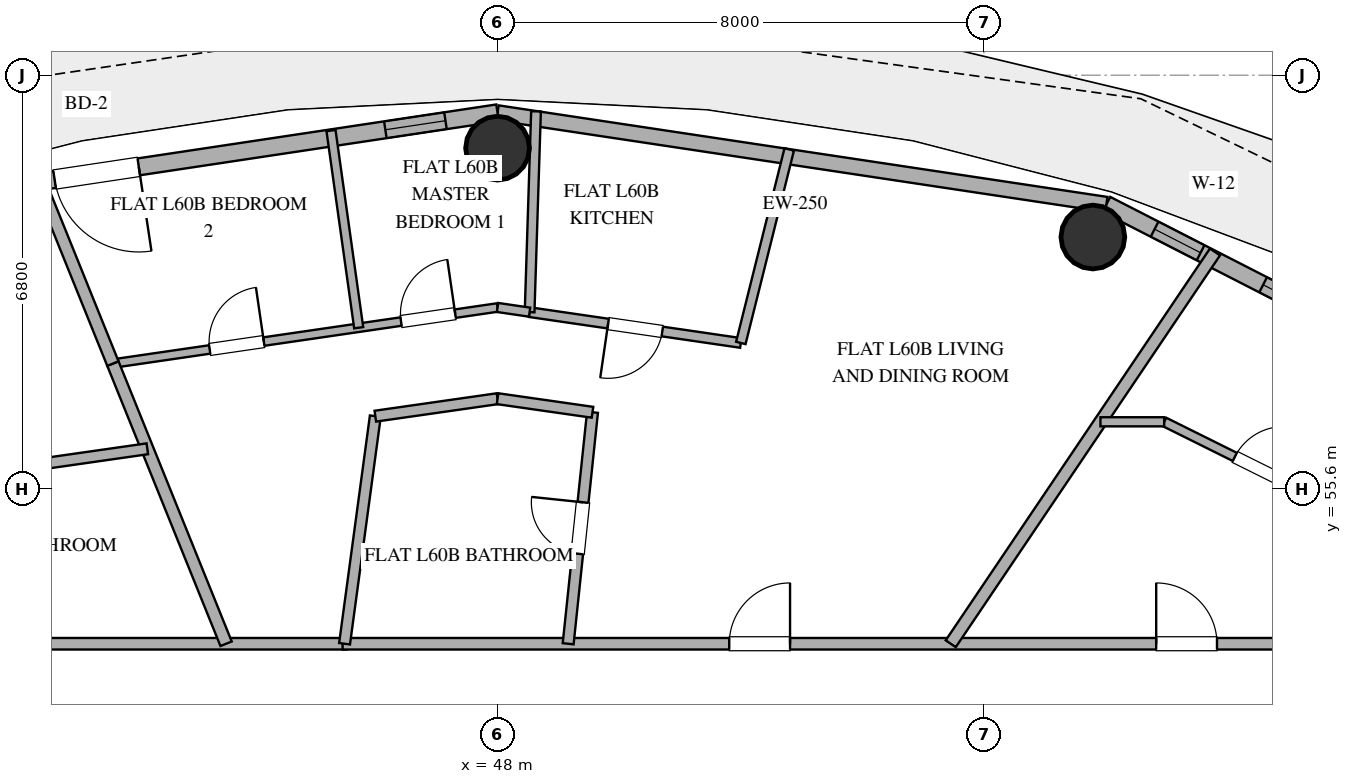
"""IFC4 building model, lengths in metres.
Left out: names, types, materials, properties, quantities, classifications, styles, units other than length and angle.
Written with IfcOpenShell. Run it as: python <this file> out.ifc"""

import sys

from ifc_helpers import new_model, si_unit, direction, frame, frame_2d, origin, origin_2d, place, context, subcontext, project, spatial, rectangle, hollow_circle, extrude, element, fill, save


model = new_model("IFC4")
c1 = context("Model", 3, precision=1e-05, world=origin(), true_north=direction((0.0, 1.0)))
c2 = subcontext(c1, "Body", "Model", "MODEL_VIEW")
j1 = project(units=[si_unit("LENGTHUNIT", "METRE"), si_unit("PLANEANGLEUNIT", "RADIAN")], contexts=[c1])
p1 = place(None, origin())
s1 = spatial("IfcSite", under=j1, at=p1, CompositionType="ELEMENT")
p2 = place(p1, origin())
s2 = spatial("IfcBuilding", under=s1, at=p2, CompositionType="ELEMENT")
p3 = place(p2, frame((0.0, 0.0, 235.2)))
s3 = spatial("IfcBuildingStorey", under=s2, at=p3, CompositionType="ELEMENT", Elevation=235.2)
for number, where, z_axis, x_axis in (
    (1, (57.791, 59.739, 0.0), (0.0, 0.0, 1.0), (1.0, 0.0, 0.0)),
    (2, (48.0, 61.2, 0.0), (0.0, 0.0, 1.0), (1.0, 0.0, 0.0)),
):
    element("IfcColumn", number, at=place(p3, frame(where, z_axis=z_axis, x_axis=x_axis)), inside=s3, PredefinedType="COLUMN", context=c2, shape_type="SweptSolid", body=[
        extrude(hollow_circle(Radius=0.525, WallThickness=0.028, at=origin_2d()), origin(), (0.0, 0.0, 1.0), 3.36),
    ])
p4 = place(p3, frame((66.383, 55.987, 0.0), z_axis=(0.0, 0.0, 1.0), x_axis=(-0.890007394051, 0.455946091699, 0.0)))
e3 = element("IfcWall", 3, at=p4, inside=s3, PredefinedType="SOLIDWALL", context=c2, shape_type="SweptSolid", body=[
    extrude(rectangle(XDim=9.404, YDim=0.28, at=frame_2d((4.702, 0.0))), origin(), (0.0, 0.0, 1.0), 3.36),
])
p5 = place(p4, frame((3.406, 0.0, 0.85)))
e4 = element("IfcOpeningElement", 4, at=p5, cuts=e3, PredefinedType="OPENING", context=c2, shape_type="SweptSolid", body=[
    extrude(rectangle(XDim=1.2, YDim=1.6, at=frame_2d((0.6, 0.8))), frame((0.0, 0.15, 0.0), z_axis=(0.0, -1.0, 0.0), x_axis=(1.0, 0.0, 0.0)), (0.0, 0.0, 1.0), 0.3),
])
p6 = place(p4, frame((5.307, 0.0, 0.85)))
e5 = element("IfcOpeningElement", 5, at=p6, cuts=e3, PredefinedType="OPENING", context=c2, shape_type="SweptSolid", body=[
    extrude(rectangle(XDim=1.2, YDim=1.6, at=frame_2d((0.6, 0.8))), frame((0.0, 0.15, 0.0), z_axis=(0.0, -1.0, 0.0), x_axis=(1.0, 0.0, 0.0)), (0.0, 0.0, 1.0), 0.3),
])
p7 = place(p4, frame((7.663, 0.0, 0.85)))
e6 = element("IfcOpeningElement", 6, at=p7, cuts=e3, PredefinedType="OPENING", context=c2, shape_type="SweptSolid", body=[
    extrude(rectangle(XDim=0.85, YDim=1.8, at=frame_2d((0.425, 0.9))), frame((0.0, 0.15, 0.0), z_axis=(0.0, -1.0, 0.0), x_axis=(1.0, 0.0, 0.0)), (0.0, 0.0, 1.0), 0.3),
])
p8 = place(p3, frame((58.013, 60.274, 0.0), z_axis=(0.0, 0.0, 1.0), x_axis=(-0.988882522213, 0.148698881169, 0.0)))
e7 = element("IfcWall", 7, at=p8, inside=s3, PredefinedType="SOLIDWALL", context=c2, shape_type="SweptSolid", body=[
    extrude(rectangle(XDim=10.125, YDim=0.25, at=frame_2d((5.062, 0.0))), origin(), (0.0, 0.0, 1.0), 3.36),
])
p9 = place(p3, frame((48.0, 61.78, 0.0), z_axis=(0.0, 0.0, 1.0), x_axis=(-0.988882522213, -0.148698881169, 0.0)))
e8 = element("IfcWall", 8, at=p9, inside=s3, PredefinedType="SOLIDWALL", context=c2, shape_type="SweptSolid", body=[
    extrude(rectangle(XDim=10.125, YDim=0.28, at=frame_2d((5.062, 0.0))), origin(), (0.0, 0.0, 1.0), 3.36),
])
p10 = place(p9, frame((5.967, 0.0, 0.0)))
e9 = element("IfcOpeningElement", 9, at=p10, cuts=e8, PredefinedType="OPENING", context=c2, shape_type="SweptSolid", body=[
    extrude(rectangle(XDim=1.4, YDim=2.2, at=frame_2d((0.7, 1.1))), frame((0.0, 0.15, 0.0), z_axis=(0.0, -1.0, 0.0), x_axis=(1.0, 0.0, 0.0)), (0.0, 0.0, 1.0), 0.3),
])
p11 = place(p9, frame((0.866, 0.0, 0.85)))
e10 = element("IfcOpeningElement", 10, at=p11, cuts=e8, PredefinedType="OPENING", context=c2, shape_type="SweptSolid", body=[
    extrude(rectangle(XDim=1.0, YDim=1.8, at=frame_2d((0.5, 0.9))), frame((0.0, 0.15, 0.0), z_axis=(0.0, -1.0, 0.0), x_axis=(1.0, 0.0, 0.0)), (0.0, 0.0, 1.0), 0.3),
])
p12 = place(p3, frame((32.75, 53.05, 0.0), z_axis=(0.0, 0.0, 1.0), x_axis=(1.0, 0.0, 0.0)))
e11 = element("IfcWall", 11, at=p12, inside=s3, PredefinedType="PARTITIONING", context=c2, shape_type="SweptSolid", body=[
    extrude(rectangle(XDim=12.766, YDim=0.19, at=frame_2d((6.383, 0.0))), origin(), (0.0, 0.0, 1.0), 2.72),
])
p13 = place(p3, frame((45.452, 53.05, 0.0), z_axis=(0.0, 0.0, 1.0), x_axis=(1.0, 0.0, 0.0)))
e12 = element("IfcWall", 12, at=p13, inside=s3, PredefinedType="PARTITIONING", context=c2, shape_type="SweptSolid", body=[
    extrude(rectangle(XDim=17.798, YDim=0.19, at=frame_2d((8.899, 0.0))), origin(), (0.0, 0.0, 1.0), 2.72),
])
p14 = place(p13, frame((13.381, 0.0, 0.0)))
e13 = element("IfcOpeningElement", 13, at=p14, cuts=e12, PredefinedType="OPENING", context=c2, shape_type="SweptSolid", body=[
    extrude(rectangle(XDim=1.0, YDim=2.2, at=frame_2d((0.5, 1.1))), frame((0.0, 0.105, 0.0), z_axis=(0.0, -1.0, 0.0), x_axis=(1.0, 0.0, 0.0)), (0.0, 0.0, 1.0), 0.21),
])
p15 = place(p13, frame((6.359, 0.0, 0.0)))
e14 = element("IfcOpeningElement", 14, at=p15, cuts=e12, PredefinedType="OPENING", context=c2, shape_type="SweptSolid", body=[
    extrude(rectangle(XDim=1.0, YDim=2.2, at=frame_2d((0.5, 1.1))), frame((0.0, 0.105, 0.0), z_axis=(0.0, -1.0, 0.0), x_axis=(1.0, 0.0, 0.0)), (0.0, 0.0, 1.0), 0.21),
])
p16 = place(p3, frame((59.799, 59.493, 0.0), z_axis=(0.0, 0.0, 1.0), x_axis=(-0.559208454265, -0.8290270832, 0.0)))
e15 = element("IfcWall", 15, at=p16, inside=s3, PredefinedType="PARTITIONING", context=c2, shape_type="SweptSolid", body=[
    extrude(rectangle(XDim=7.771, YDim=0.2, at=frame_2d((3.886, 0.0))), origin(), (0.0, 0.0, 1.0), 2.72),
])
p17 = place(p3, frame((41.674, 57.657, 0.0), z_axis=(0.0, 0.0, 1.0), x_axis=(0.989537524877, 0.144275732054, 0.0)))
e16 = element("IfcWall", 16, at=p17, inside=s3, PredefinedType="PARTITIONING", context=c2, shape_type="SweptSolid", body=[
    extrude(rectangle(XDim=6.393, YDim=0.14, at=frame_2d((3.197, 0.0))), origin(), (0.0, 0.0, 1.0), 2.72),
])
p18 = place(p17, frame((1.609, 0.0, 0.0)))
e17 = element("IfcOpeningElement", 17, at=p18, cuts=e16, PredefinedType="OPENING", context=c2, shape_type="SweptSolid", body=[
    extrude(rectangle(XDim=0.9, YDim=2.1, at=frame_2d((0.45, 1.05))), frame((0.0, 0.08, 0.0), z_axis=(0.0, -1.0, 0.0), x_axis=(1.0, 0.0, 0.0)), (0.0, 0.0, 1.0), 0.16),
])
p19 = place(p17, frame((4.789, 0.0, 0.0)))
e18 = element("IfcOpeningElement", 18, at=p19, cuts=e16, PredefinedType="OPENING", context=c2, shape_type="SweptSolid", body=[
    extrude(rectangle(XDim=0.9, YDim=2.1, at=frame_2d((0.45, 1.05))), frame((0.0, 0.08, 0.0), z_axis=(0.0, -1.0, 0.0), x_axis=(1.0, 0.0, 0.0)), (0.0, 0.0, 1.0), 0.16),
])
p20 = place(p3, frame((49.161, 53.05, 0.0), z_axis=(0.0, 0.0, 1.0), x_axis=(0.10454201208, 0.994520471237, 0.0)))
e19 = element("IfcWall", 19, at=p20, inside=s3, PredefinedType="PLUMBINGWALL", context=c2, shape_type="SweptSolid", body=[
    extrude(rectangle(XDim=3.828, YDim=0.18, at=frame_2d((1.914, 0.0))), origin(), (0.0, 0.0, 1.0), 2.72),
])
p21 = place(p20, frame((1.489, 0.0, 0.0)))
e20 = element("IfcOpeningElement", 20, at=p21, cuts=e19, PredefinedType="OPENING", context=c2, shape_type="SweptSolid", body=[
    extrude(rectangle(XDim=0.85, YDim=2.1, at=frame_2d((0.425, 1.05))), frame((0.0, 0.1, 0.0), z_axis=(0.0, -1.0, 0.0), x_axis=(1.0, 0.0, 0.0)), (0.0, 0.0, 1.0), 0.2),
])
p22 = place(p3, frame((45.99, 56.792, 0.0), z_axis=(0.0, 0.0, 1.0), x_axis=(-0.134013985284, -0.990979440628, 0.0)))
e21 = element("IfcWall", 21, at=p22, inside=s3, PredefinedType="PLUMBINGWALL", context=c2, shape_type="SweptSolid", body=[
    extrude(rectangle(XDim=3.777, YDim=0.18, at=frame_2d((1.888, 0.0))), origin(), (0.0, 0.0, 1.0), 2.72),
])
p23 = place(p3, frame((52.001, 57.997, 0.0), z_axis=(0.0, 0.0, 1.0), x_axis=(-0.989533601714, 0.144302637118, 0.0)))
e22 = element("IfcWall", 22, at=p23, inside=s3, PredefinedType="PLUMBINGWALL", context=c2, shape_type="SweptSolid", body=[
    extrude(rectangle(XDim=3.511, YDim=0.16, at=frame_2d((1.755, 0.0))), origin(), (0.0, 0.0, 1.0), 2.72),
])
p24 = place(p23, frame((1.305, 0.0, 0.0)))
e23 = element("IfcOpeningElement", 23, at=p24, cuts=e22, PredefinedType="OPENING", context=c2, shape_type="SweptSolid", body=[
    extrude(rectangle(XDim=0.9, YDim=2.1, at=frame_2d((0.45, 1.05))), frame((0.0, 0.09, 0.0), z_axis=(0.0, -1.0, 0.0), x_axis=(1.0, 0.0, 0.0)), (0.0, 0.0, 1.0), 0.18),
])
p25 = place(p3, frame((58.964, 56.7, 0.0), z_axis=(0.0, 0.0, 1.0), x_axis=(0.895471406875, -0.445119039661, 0.0)))
e24 = element("IfcWall", 24, at=p25, inside=s3, PredefinedType="PARTITIONING", context=c2, shape_type="SweptSolid", body=[
    extrude(rectangle(XDim=5.971, YDim=0.15, at=frame_2d((2.986, 0.0))), origin(), (0.0, 0.0, 1.0), 2.72),
])
p26 = place(p25, frame((1.297, 0.0, 0.0)))
e25 = element("IfcOpeningElement", 25, at=p26, cuts=e24, PredefinedType="OPENING", context=c2, shape_type="SweptSolid", body=[
    extrude(rectangle(XDim=0.9, YDim=2.1, at=frame_2d((0.45, 1.05))), frame((0.0, 0.085, 0.0), z_axis=(0.0, -1.0, 0.0), x_axis=(1.0, 0.0, 0.0)), (0.0, 0.0, 1.0), 0.17),
])
p27 = place(p25, frame((4.266, 0.0, 0.0)))
e26 = element("IfcOpeningElement", 26, at=p27, cuts=e24, PredefinedType="OPENING", context=c2, shape_type="SweptSolid", body=[
    extrude(rectangle(XDim=0.9, YDim=2.1, at=frame_2d((0.45, 1.05))), frame((0.0, 0.085, 0.0), z_axis=(0.0, -1.0, 0.0), x_axis=(1.0, 0.0, 0.0)), (0.0, 0.0, 1.0), 0.17),
])
p28 = place(p3, frame((41.674, 57.657, 0.0), z_axis=(0.0, 0.0, 1.0), x_axis=(0.374573524941, -0.927197214412, 0.0)))
e27 = element("IfcWall", 27, at=p28, inside=s3, PredefinedType="PARTITIONING", context=c2, shape_type="SweptSolid", body=[
    extrude(rectangle(XDim=4.969, YDim=0.2, at=frame_2d((2.485, 0.0))), origin(), (0.0, 0.0, 1.0), 2.72),
])
p29 = place(p3, frame((41.674, 57.657, 0.0), z_axis=(0.0, 0.0, 1.0), x_axis=(-0.374572886439, 0.927197472357, 0.0)))
e28 = element("IfcWall", 28, at=p29, inside=s3, PredefinedType="PARTITIONING", context=c2, shape_type="SweptSolid", body=[
    extrude(rectangle(XDim=3.344, YDim=0.2, at=frame_2d((1.672, 0.0))), origin(), (0.0, 0.0, 1.0), 2.72),
])
p30 = place(p3, frame((48.633, 61.805, 0.0), z_axis=(0.0, 0.0, 1.0), x_axis=(-0.031996030035, -0.999487995957, 0.0)))
e29 = element("IfcWall", 29, at=p30, inside=s3, PredefinedType="PLUMBINGWALL", context=c2, shape_type="SweptSolid", body=[
    extrude(rectangle(XDim=3.304, YDim=0.16, at=frame_2d((1.652, 0.0))), origin(), (0.0, 0.0, 1.0), 2.72),
])
p31 = place(p3, frame((52.797, 61.179, 0.0), z_axis=(0.0, 0.0, 1.0), x_axis=(-0.242658184372, -0.970111852086, 0.0)))
e30 = element("IfcWall", 30, at=p31, inside=s3, PredefinedType="PLUMBINGWALL", context=c2, shape_type="SweptSolid", body=[
    extrude(rectangle(XDim=3.281, YDim=0.16, at=frame_2d((1.641, 0.0))), origin(), (0.0, 0.0, 1.0), 2.72),
])
p32 = place(p3, frame((45.717, 58.247, 0.0), z_axis=(0.0, 0.0, 1.0), x_axis=(-0.139134872395, 0.990273440664, 0.0)))
e31 = element("IfcWall", 31, at=p32, inside=s3, PredefinedType="PARTITIONING", context=c2, shape_type="SweptSolid", body=[
    extrude(rectangle(XDim=3.274, YDim=0.15, at=frame_2d((1.637, 0.0))), origin(), (0.0, 0.0, 1.0), 2.72),
])
p33 = place(p3, frame((39.976, 55.932, 0.0), z_axis=(0.0, 0.0, 1.0), x_axis=(0.989917445937, 0.141645509032, 0.0)))
e32 = element("IfcWall", 32, at=p33, inside=s3, PredefinedType="PLUMBINGWALL", context=c2, shape_type="SweptSolid", body=[
    extrude(rectangle(XDim=2.287, YDim=0.18, at=frame_2d((1.144, 0.0))), origin(), (0.0, 0.0, 1.0), 2.72),
])
p34 = place(p3, frame((48.0, 57.08, 0.0), z_axis=(0.0, 0.0, 1.0), x_axis=(-0.989918207634, -0.141640185666, 0.0)))
e33 = element("IfcWall", 33, at=p34, inside=s3, PredefinedType="PLUMBINGWALL", context=c2, shape_type="SweptSolid", body=[
    extrude(rectangle(XDim=2.031, YDim=0.18, at=frame_2d((1.015, 0.0))), origin(), (0.0, 0.0, 1.0), 2.72),
])
p35 = place(p3, frame((49.562, 56.857, 0.0), z_axis=(0.0, 0.0, 1.0), x_axis=(-0.989921615496, 0.141616366194, 0.0)))
e34 = element("IfcWall", 34, at=p35, inside=s3, PredefinedType="PLUMBINGWALL", context=c2, shape_type="SweptSolid", body=[
    extrude(rectangle(XDim=1.577, YDim=0.18, at=frame_2d((0.789, 0.0))), origin(), (0.0, 0.0, 1.0), 2.72),
])
p36 = place(p3, frame((57.915, 56.7, 0.0), z_axis=(0.0, 0.0, 1.0), x_axis=(1.0, 0.0, 0.0)))
e35 = element("IfcWall", 35, at=p36, inside=s3, PredefinedType="PARTITIONING", context=c2, shape_type="SweptSolid", body=[
    extrude(rectangle(XDim=1.049, YDim=0.15, at=frame_2d((0.524, 0.0))), origin(), (0.0, 0.0, 1.0), 2.72),
])
p37 = place(p3, frame((48.527, 58.503, 0.0), z_axis=(0.0, 0.0, 1.0), x_axis=(-0.989523434522, 0.144372339914, 0.0)))
e36 = element("IfcWall", 36, at=p37, inside=s3, PredefinedType="PARTITIONING", context=c2, shape_type="SweptSolid", body=[
    extrude(rectangle(XDim=0.533, YDim=0.15, at=frame_2d((0.266, 0.0))), origin(), (0.0, 0.0, 1.0), 2.72),
])
p38 = place(p6, origin())
e37 = element("IfcWindow", 37, at=p38, inside=s3, PartitioningType="SINGLE_PANEL", PredefinedType="WINDOW", context=c2, shape_type="SweptSolid", body=[
    extrude(rectangle(XDim=1.2, YDim=1.6, at=frame_2d((0.6, 0.8))), frame((0.0, 0.03, 0.0), z_axis=(0.0, -1.0, 0.0), x_axis=(1.0, 0.0, 0.0)), (0.0, 0.0, 1.0), 0.06),
])
fill(e5, e37)
p39 = place(p10, origin())
e38 = element("IfcDoor", 38, at=p39, inside=s3, OperationType="SINGLE_SWING_LEFT", PredefinedType="DOOR", context=c2, shape_type="SweptSolid", body=[
    extrude(rectangle(XDim=1.4, YDim=2.2, at=frame_2d((0.7, 1.1))), frame((0.0, 0.025, 0.0), z_axis=(0.0, -1.0, 0.0), x_axis=(1.0, 0.0, 0.0)), (0.0, 0.0, 1.0), 0.05),
])
fill(e9, e38)
p40 = place(p7, origin())
e39 = element("IfcWindow", 39, at=p40, inside=s3, PartitioningType="SINGLE_PANEL", PredefinedType="WINDOW", context=c2, shape_type="SweptSolid", body=[
    extrude(rectangle(XDim=0.85, YDim=1.8, at=frame_2d((0.425, 0.9))), frame((0.0, 0.03, 0.0), z_axis=(0.0, -1.0, 0.0), x_axis=(1.0, 0.0, 0.0)), (0.0, 0.0, 1.0), 0.06),
])
fill(e6, e39)
p41 = place(p11, origin())
e40 = element("IfcWindow", 40, at=p41, inside=s3, PartitioningType="SINGLE_PANEL", PredefinedType="WINDOW", context=c2, shape_type="SweptSolid", body=[
    extrude(rectangle(XDim=1.0, YDim=1.8, at=frame_2d((0.5, 0.9))), frame((0.0, 0.03, 0.0), z_axis=(0.0, -1.0, 0.0), x_axis=(1.0, 0.0, 0.0)), (0.0, 0.0, 1.0), 0.06),
])
fill(e10, e40)
p42 = place(p14, origin())
e41 = element("IfcDoor", 41, at=p42, inside=s3, OperationType="SINGLE_SWING_LEFT", PredefinedType="DOOR", context=c2, shape_type="SweptSolid", body=[
    extrude(rectangle(XDim=1.0, YDim=2.2, at=frame_2d((0.5, 1.1))), frame((0.0, 0.025, 0.0), z_axis=(0.0, -1.0, 0.0), x_axis=(1.0, 0.0, 0.0)), (0.0, 0.0, 1.0), 0.05),
])
fill(e13, e41)
p43 = place(p15, origin())
e42 = element("IfcDoor", 42, at=p43, inside=s3, OperationType="SINGLE_SWING_RIGHT", PredefinedType="DOOR", context=c2, shape_type="SweptSolid", body=[
    extrude(rectangle(XDim=1.0, YDim=2.2, at=frame_2d((0.5, 1.1))), frame((0.0, 0.025, 0.0), z_axis=(0.0, -1.0, 0.0), x_axis=(1.0, 0.0, 0.0)), (0.0, 0.0, 1.0), 0.05),
])
fill(e14, e42)
p44 = place(p18, origin())
e43 = element("IfcDoor", 43, at=p44, inside=s3, OperationType="SINGLE_SWING_RIGHT", PredefinedType="DOOR", context=c2, shape_type="SweptSolid", body=[
    extrude(rectangle(XDim=0.9, YDim=2.1, at=frame_2d((0.45, 1.05))), frame((0.0, 0.025, 0.0), z_axis=(0.0, -1.0, 0.0), x_axis=(1.0, 0.0, 0.0)), (0.0, 0.0, 1.0), 0.05),
])
fill(e17, e43)
p45 = place(p19, origin())
e44 = element("IfcDoor", 44, at=p45, inside=s3, OperationType="SINGLE_SWING_RIGHT", PredefinedType="DOOR", context=c2, shape_type="SweptSolid", body=[
    extrude(rectangle(XDim=0.9, YDim=2.1, at=frame_2d((0.45, 1.05))), frame((0.0, 0.025, 0.0), z_axis=(0.0, -1.0, 0.0), x_axis=(1.0, 0.0, 0.0)), (0.0, 0.0, 1.0), 0.05),
])
fill(e18, e44)
p46 = place(p21, origin())
e45 = element("IfcDoor", 45, at=p46, inside=s3, OperationType="SINGLE_SWING_RIGHT", PredefinedType="DOOR", context=c2, shape_type="SweptSolid", body=[
    extrude(rectangle(XDim=0.85, YDim=2.1, at=frame_2d((0.425, 1.05))), frame((0.0, 0.025, 0.0), z_axis=(0.0, -1.0, 0.0), x_axis=(1.0, 0.0, 0.0)), (0.0, 0.0, 1.0), 0.05),
])
fill(e20, e45)
p47 = place(p24, origin())
e46 = element("IfcDoor", 46, at=p47, inside=s3, OperationType="SINGLE_SWING_RIGHT", PredefinedType="DOOR", context=c2, shape_type="SweptSolid", body=[
    extrude(rectangle(XDim=0.9, YDim=2.1, at=frame_2d((0.45, 1.05))), frame((0.0, 0.025, 0.0), z_axis=(0.0, -1.0, 0.0), x_axis=(1.0, 0.0, 0.0)), (0.0, 0.0, 1.0), 0.05),
])
fill(e23, e46)
p48 = place(p26, origin())
e47 = element("IfcDoor", 47, at=p48, inside=s3, OperationType="SINGLE_SWING_RIGHT", PredefinedType="DOOR", context=c2, shape_type="SweptSolid", body=[
    extrude(rectangle(XDim=0.9, YDim=2.1, at=frame_2d((0.45, 1.05))), frame((0.0, 0.025, 0.0), z_axis=(0.0, -1.0, 0.0), x_axis=(1.0, 0.0, 0.0)), (0.0, 0.0, 1.0), 0.05),
])
fill(e25, e47)
save(model, sys.argv[1])
